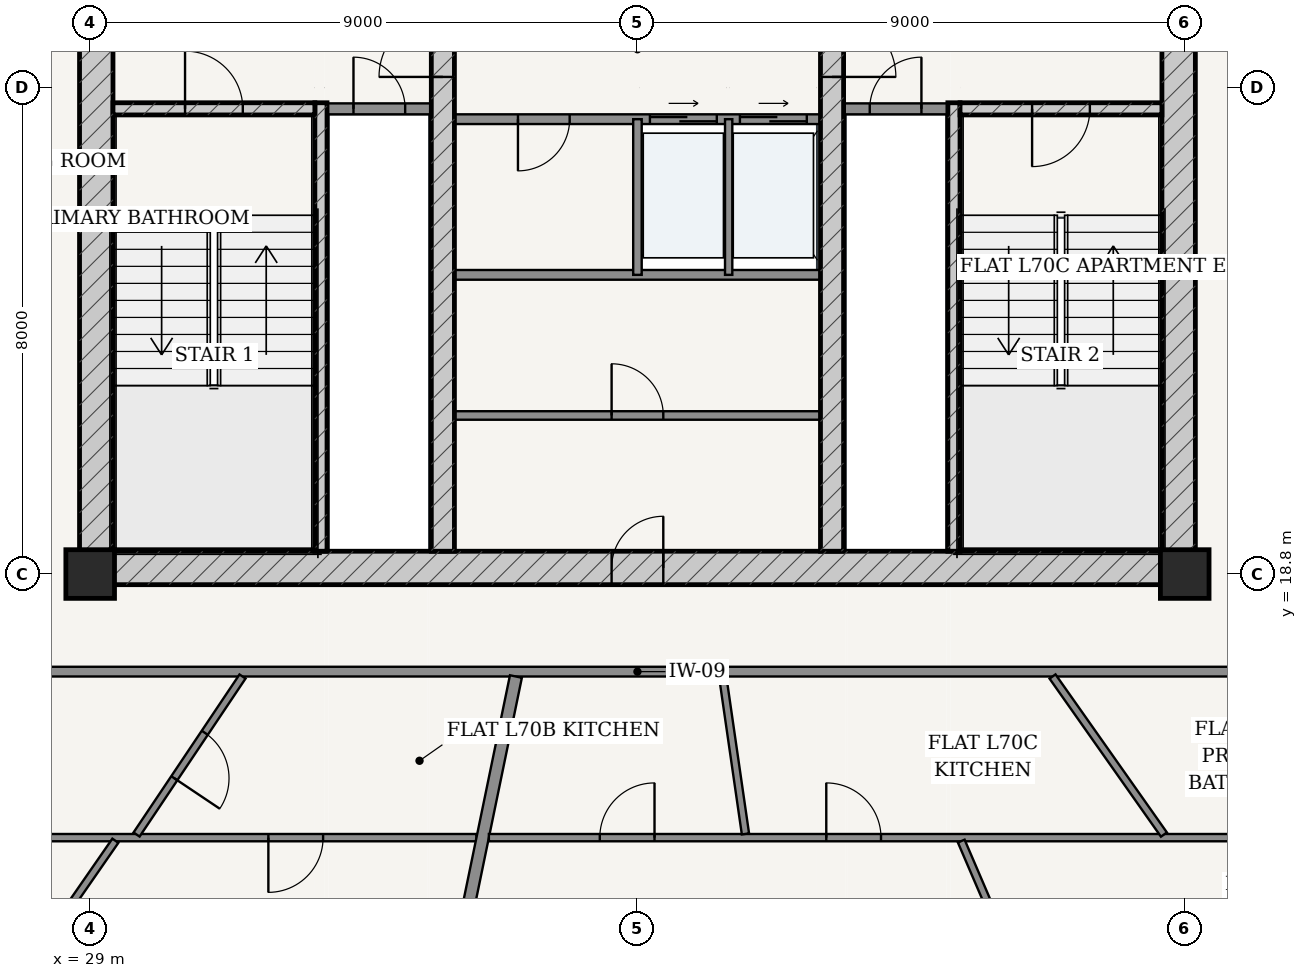
"""IFC4 building model, lengths in metres.
Left out: names, types, materials, properties, quantities, classifications, styles, units other than length and angle.
Written with IfcOpenShell. Run it as: python <this file> out.ifc"""

import sys

from ifc_helpers import new_model, si_unit, direction, frame, frame_2d, origin, origin_2d, place, context, subcontext, project, spatial, rectangle, extrude, source, transform, mapped, element, fill, save


model = new_model("IFC4")
c1 = context("Model", 3, precision=1e-05, world=origin(), true_north=direction((-0.2419218956, 0.970295726276)))
c2 = subcontext(c1, "Body", "Model", "MODEL_VIEW")
j1 = project(units=[si_unit("LENGTHUNIT", "METRE"), si_unit("PLANEANGLEUNIT", "RADIAN")], contexts=[c1])
p1 = place(None, origin())
s1 = spatial("IfcSite", under=j1, at=p1, CompositionType="ELEMENT")
p2 = place(p1, origin())
s2 = spatial("IfcBuilding", under=s1, at=p2, CompositionType="ELEMENT")
p3 = place(p2, frame((0.0, 0.0, 266.95)))
s3 = spatial("IfcBuildingStorey", under=s2, at=p3, CompositionType="ELEMENT", Elevation=266.95)
for number, where, z_axis, x_axis in (
    (1, (29.0, 18.8, 0.0), (0.0, 0.0, 1.0), (1.0, 0.0, 0.0)),
    (2, (47.0, 18.8, 0.0), (0.0, 0.0, 1.0), (1.0, 0.0, 0.0)),
):
    element("IfcColumn", number, at=place(p3, frame(where, z_axis=z_axis, x_axis=x_axis)), inside=s3, PredefinedType="COLUMN", context=c2, shape_type="SweptSolid", body=[
        extrude(rectangle(XDim=0.8, YDim=0.8, at=origin_2d()), origin(), (0.0, 0.0, 1.0), 3.75),
    ])
p4 = place(p3, frame((28.825, 18.9, 0.0), z_axis=(0.0, 0.0, 1.0), x_axis=(1.0, 0.0, 0.0)))
e3 = element("IfcWall", 3, at=p4, inside=s3, PredefinedType="SHEAR", context=c2, shape_type="SweptSolid", body=[
    extrude(rectangle(XDim=18.35, YDim=0.55, at=frame_2d((9.175, 0.0))), origin(), (0.0, 0.0, 1.0), 3.49),
])
p5 = place(p4, frame((8.75, 0.0, 0.0)))
e4 = element("IfcOpeningElement", 4, at=p5, cuts=e3, PredefinedType="OPENING", context=c2, shape_type="SweptSolid", body=[
    extrude(rectangle(XDim=0.85, YDim=2.1, at=frame_2d((0.425, 1.05))), frame((0.0, 0.285, 0.0), z_axis=(0.0, -1.0, 0.0), x_axis=(1.0, 0.0, 0.0)), (0.0, 0.0, 1.0), 0.57),
])
p6 = place(p3, frame((29.1, 19.175, 0.0), z_axis=(0.0, 0.0, 1.0), x_axis=(0.0, 1.0, 0.0)))
e5 = element("IfcWall", 5, at=p6, inside=s3, PredefinedType="SHEAR", context=c2, shape_type="SweptSolid", body=[
    extrude(rectangle(XDim=15.25, YDim=0.55, at=frame_2d((7.625, 0.0))), origin(), (0.0, 0.0, 1.0), 3.49),
])
p7 = place(p6, frame((9.875, 0.0, 0.0)))
e6 = element("IfcOpeningElement", 6, at=p7, cuts=e5, PredefinedType="OPENING", context=c2, shape_type="SweptSolid", body=[
    extrude(rectangle(XDim=1.5, YDim=2.2, at=frame_2d((0.75, 1.1))), frame((0.0, 0.285, 0.0), z_axis=(0.0, -1.0, 0.0), x_axis=(1.0, 0.0, 0.0)), (0.0, 0.0, 1.0), 0.57),
])
p8 = place(p3, frame((46.9, 19.175, 0.0), z_axis=(0.0, 0.0, 1.0), x_axis=(0.0, 1.0, 0.0)))
e7 = element("IfcWall", 7, at=p8, inside=s3, PredefinedType="SHEAR", context=c2, shape_type="SweptSolid", body=[
    extrude(rectangle(XDim=15.25, YDim=0.55, at=frame_2d((7.625, 0.0))), origin(), (0.0, 0.0, 1.0), 3.49),
])
p9 = place(p8, frame((9.875, 0.0, 0.0)))
e8 = element("IfcOpeningElement", 8, at=p9, cuts=e7, PredefinedType="OPENING", context=c2, shape_type="SweptSolid", body=[
    extrude(rectangle(XDim=1.5, YDim=2.2, at=frame_2d((0.75, 1.1))), frame((0.0, 0.285, 0.0), z_axis=(0.0, -1.0, 0.0), x_axis=(1.0, 0.0, 0.0)), (0.0, 0.0, 1.0), 0.57),
])
p10 = place(p3, frame((32.795, 19.175, 0.0), z_axis=(0.0, 0.0, 1.0), x_axis=(0.0, 1.0, 0.0)))
e9 = element("IfcWall", 9, at=p10, inside=s3, PredefinedType="SOLIDWALL", context=c2, shape_type="SweptSolid", body=[
    extrude(rectangle(XDim=7.375, YDim=0.2, at=frame_2d((3.688, 0.0))), origin(), (0.0, 0.0, 1.0), 3.49),
])
p11 = place(p3, frame((29.375, 26.45, 0.0), z_axis=(0.0, 0.0, 1.0), x_axis=(1.0, 0.0, 0.0)))
e10 = element("IfcWall", 10, at=p11, inside=s3, PredefinedType="SOLIDWALL", context=c2, shape_type="SweptSolid", body=[
    extrude(rectangle(XDim=3.32, YDim=0.2, at=frame_2d((1.66, 0.0))), origin(), (0.0, 0.0, 1.0), 3.49),
])
p12 = place(p11, frame((1.185, 0.0, 0.0)))
e11 = element("IfcOpeningElement", 11, at=p12, cuts=e10, PredefinedType="OPENING", context=c2, shape_type="SweptSolid", body=[
    extrude(rectangle(XDim=0.95, YDim=2.15, at=frame_2d((0.475, 1.075))), frame((0.0, 0.11, 0.0), z_axis=(0.0, -1.0, 0.0), x_axis=(1.0, 0.0, 0.0)), (0.0, 0.0, 1.0), 0.22),
])
p13 = place(p3, frame((43.205, 19.175, 0.0), z_axis=(0.0, 0.0, 1.0), x_axis=(0.0, 1.0, 0.0)))
e12 = element("IfcWall", 12, at=p13, inside=s3, PredefinedType="SOLIDWALL", context=c2, shape_type="SweptSolid", body=[
    extrude(rectangle(XDim=7.375, YDim=0.2, at=frame_2d((3.688, 0.0))), origin(), (0.0, 0.0, 1.0), 3.49),
])
p14 = place(p3, frame((43.305, 26.45, 0.0), z_axis=(0.0, 0.0, 1.0), x_axis=(1.0, 0.0, 0.0)))
e13 = element("IfcWall", 13, at=p14, inside=s3, PredefinedType="SOLIDWALL", context=c2, shape_type="SweptSolid", body=[
    extrude(rectangle(XDim=3.32, YDim=0.2, at=frame_2d((1.66, 0.0))), origin(), (0.0, 0.0, 1.0), 3.49),
])
p15 = place(p14, frame((1.185, 0.0, 0.0)))
e14 = element("IfcOpeningElement", 14, at=p15, cuts=e13, PredefinedType="OPENING", context=c2, shape_type="SweptSolid", body=[
    extrude(rectangle(XDim=0.95, YDim=2.15, at=frame_2d((0.475, 1.075))), frame((0.0, 0.11, 0.0), z_axis=(0.0, -1.0, 0.0), x_axis=(1.0, 0.0, 0.0)), (0.0, 0.0, 1.0), 0.22),
])
p16 = place(p3, frame((34.8, 19.175, 0.0), z_axis=(0.0, 0.0, 1.0), x_axis=(0.0, 1.0, 0.0)))
e15 = element("IfcWall", 15, at=p16, inside=s3, PredefinedType="SHEAR", context=c2, shape_type="SweptSolid", body=[
    extrude(rectangle(XDim=15.25, YDim=0.38, at=frame_2d((7.625, 0.0))), origin(), (0.0, 0.0, 1.0), 3.49),
])
p17 = place(p16, frame((7.8, 0.0, 0.0)))
e16 = element("IfcOpeningElement", 16, at=p17, cuts=e15, PredefinedType="OPENING", context=c2, shape_type="SweptSolid", body=[
    extrude(rectangle(XDim=1.05, YDim=2.15, at=frame_2d((0.525, 1.075))), frame((0.0, 0.2, 0.0), z_axis=(0.0, -1.0, 0.0), x_axis=(1.0, 0.0, 0.0)), (0.0, 0.0, 1.0), 0.4),
])
p18 = place(p3, frame((41.2, 19.175, 0.0), z_axis=(0.0, 0.0, 1.0), x_axis=(0.0, 1.0, 0.0)))
e17 = element("IfcWall", 17, at=p18, inside=s3, PredefinedType="SHEAR", context=c2, shape_type="SweptSolid", body=[
    extrude(rectangle(XDim=15.25, YDim=0.38, at=frame_2d((7.625, 0.0))), origin(), (0.0, 0.0, 1.0), 3.49),
])
p19 = place(p18, frame((7.8, 0.0, 0.0)))
e18 = element("IfcOpeningElement", 18, at=p19, cuts=e17, PredefinedType="OPENING", context=c2, shape_type="SweptSolid", body=[
    extrude(rectangle(XDim=1.05, YDim=2.15, at=frame_2d((0.525, 1.075))), frame((0.0, 0.2, 0.0), z_axis=(0.0, -1.0, 0.0), x_axis=(1.0, 0.0, 0.0)), (0.0, 0.0, 1.0), 0.4),
])
p20 = place(p3, frame((32.9, 26.45, 0.0), z_axis=(0.0, 0.0, 1.0), x_axis=(1.0, 0.0, 0.0)))
e19 = element("IfcWall", 19, at=p20, inside=s3, PredefinedType="PARTITIONING", context=c2, shape_type="SweptSolid", body=[
    extrude(rectangle(XDim=1.71, YDim=0.18, at=frame_2d((0.855, 0.0))), origin(), (0.0, 0.0, 1.0), 3.49),
])
p21 = place(p20, frame((0.43, 0.0, 0.0)))
e20 = element("IfcOpeningElement", 20, at=p21, cuts=e19, PredefinedType="OPENING", context=c2, shape_type="SweptSolid", body=[
    extrude(rectangle(XDim=0.85, YDim=2.1, at=frame_2d((0.425, 1.05))), frame((0.0, 0.1, 0.0), z_axis=(0.0, -1.0, 0.0), x_axis=(1.0, 0.0, 0.0)), (0.0, 0.0, 1.0), 0.2),
])
p22 = place(p3, frame((41.39, 26.45, 0.0), z_axis=(0.0, 0.0, 1.0), x_axis=(1.0, 0.0, 0.0)))
e21 = element("IfcWall", 21, at=p22, inside=s3, PredefinedType="PARTITIONING", context=c2, shape_type="SweptSolid", body=[
    extrude(rectangle(XDim=1.71, YDim=0.18, at=frame_2d((0.855, 0.0))), origin(), (0.0, 0.0, 1.0), 3.49),
])
p23 = place(p22, frame((0.43, 0.0, 0.0)))
e22 = element("IfcOpeningElement", 22, at=p23, cuts=e21, PredefinedType="OPENING", context=c2, shape_type="SweptSolid", body=[
    extrude(rectangle(XDim=0.85, YDim=2.1, at=frame_2d((0.425, 1.05))), frame((0.0, 0.1, 0.0), z_axis=(0.0, -1.0, 0.0), x_axis=(1.0, 0.0, 0.0)), (0.0, 0.0, 1.0), 0.2),
])
p24 = place(p3, frame((34.99, 26.28, 0.0), z_axis=(0.0, 0.0, 1.0), x_axis=(1.0, 0.0, 0.0)))
e23 = element("IfcWall", 23, at=p24, inside=s3, PredefinedType="PARTITIONING", context=c2, shape_type="SweptSolid", body=[
    extrude(rectangle(XDim=6.02, YDim=0.16, at=frame_2d((3.01, 0.0))), origin(), (0.0, 0.0, 1.0), 3.49),
])
p25 = place(p24, frame((1.045, 0.0, 0.0)))
e24 = element("IfcOpeningElement", 24, at=p25, cuts=e23, PredefinedType="OPENING", context=c2, shape_type="SweptSolid", body=[
    extrude(rectangle(XDim=0.85, YDim=2.1, at=frame_2d((0.425, 1.05))), frame((0.0, 0.09, 0.0), z_axis=(0.0, -1.0, 0.0), x_axis=(1.0, 0.0, 0.0)), (0.0, 0.0, 1.0), 0.18),
])
p26 = place(p24, frame((3.215, 0.0, 0.0)))
e25 = element("IfcOpeningElement", 25, at=p26, cuts=e23, PredefinedType="OPENING", context=c2, shape_type="SweptSolid", body=[
    extrude(rectangle(XDim=1.1, YDim=2.2, at=frame_2d((0.55, 1.1))), frame((0.0, 0.09, 0.0), z_axis=(0.0, -1.0, 0.0), x_axis=(1.0, 0.0, 0.0)), (0.0, 0.0, 1.0), 0.18),
])
p27 = place(p24, frame((4.695, 0.0, 0.0)))
e26 = element("IfcOpeningElement", 26, at=p27, cuts=e23, PredefinedType="OPENING", context=c2, shape_type="SweptSolid", body=[
    extrude(rectangle(XDim=1.1, YDim=2.2, at=frame_2d((0.55, 1.1))), frame((0.0, 0.09, 0.0), z_axis=(0.0, -1.0, 0.0), x_axis=(1.0, 0.0, 0.0)), (0.0, 0.0, 1.0), 0.18),
])
p28 = place(p3, frame((34.99, 23.72, 0.0), z_axis=(0.0, 0.0, 1.0), x_axis=(1.0, 0.0, 0.0)))
e27 = element("IfcWall", 27, at=p28, inside=s3, PredefinedType="PARTITIONING", context=c2, shape_type="SweptSolid", body=[
    extrude(rectangle(XDim=6.02, YDim=0.16, at=frame_2d((3.01, 0.0))), origin(), (0.0, 0.0, 1.0), 3.49),
])
p29 = place(p3, frame((38.0, 23.72, 0.0), z_axis=(0.0, 0.0, 1.0), x_axis=(0.0, 1.0, 0.0)))
e28 = element("IfcWall", 28, at=p29, inside=s3, PredefinedType="PARTITIONING", context=c2, shape_type="SweptSolid", body=[
    extrude(rectangle(XDim=2.56, YDim=0.14, at=frame_2d((1.28, 0.0))), origin(), (0.0, 0.0, 1.0), 3.49),
])
p30 = place(p3, frame((39.5, 23.72, 0.0), z_axis=(0.0, 0.0, 1.0), x_axis=(0.0, 1.0, 0.0)))
e29 = element("IfcWall", 29, at=p30, inside=s3, PredefinedType="PARTITIONING", context=c2, shape_type="SweptSolid", body=[
    extrude(rectangle(XDim=2.56, YDim=0.12, at=frame_2d((1.28, 0.0))), origin(), (0.0, 0.0, 1.0), 3.49),
])
p31 = place(p3, frame((34.99, 21.407, 0.0), z_axis=(0.0, 0.0, 1.0), x_axis=(1.0, 0.0, 0.0)))
e30 = element("IfcWall", 30, at=p31, inside=s3, PredefinedType="PARTITIONING", context=c2, shape_type="SweptSolid", body=[
    extrude(rectangle(XDim=6.02, YDim=0.14, at=frame_2d((3.01, 0.0))), origin(), (0.0, 0.0, 1.0), 3.49),
])
p32 = place(p31, frame((2.585, 0.0, 0.0)))
e31 = element("IfcOpeningElement", 31, at=p32, cuts=e30, PredefinedType="OPENING", context=c2, shape_type="SweptSolid", body=[
    extrude(rectangle(XDim=0.85, YDim=2.1, at=frame_2d((0.425, 1.05))), frame((0.0, 0.08, 0.0), z_axis=(0.0, -1.0, 0.0), x_axis=(1.0, 0.0, 0.0)), (0.0, 0.0, 1.0), 0.16),
])
p33 = place(p3, frame((26.895, 17.195, 0.0), z_axis=(0.0, 0.0, 1.0), x_axis=(1.0, 0.0, 0.0)))
e32 = element("IfcWall", 32, at=p33, inside=s3, PredefinedType="PARTITIONING", context=c2, shape_type="SweptSolid", body=[
    extrude(rectangle(XDim=22.21, YDim=0.16, at=frame_2d((11.105, 0.0))), origin(), (0.0, 0.0, 1.0), 3.015),
])
p34 = place(p3, frame((35.353, 14.465, 0.0), z_axis=(0.0, 0.0, 1.0), x_axis=(-1.0, 0.0, 0.0)))
e33 = element("IfcWall", 33, at=p34, inside=s3, PredefinedType="PARTITIONING", context=c2, shape_type="SweptSolid", body=[
    extrude(rectangle(XDim=11.188, YDim=0.12, at=frame_2d((5.594, 0.0))), origin(), (0.0, 0.0, 1.0), 3.015),
])
p35 = place(p34, frame((2.522, 0.0, 0.0)))
e34 = element("IfcOpeningElement", 34, at=p35, cuts=e33, PredefinedType="OPENING", context=c2, shape_type="SweptSolid", body=[
    extrude(rectangle(XDim=0.9, YDim=2.15, at=frame_2d((0.45, 1.075))), frame((0.0, 0.07, 0.0), z_axis=(0.0, -1.0, 0.0), x_axis=(1.0, 0.0, 0.0)), (0.0, 0.0, 1.0), 0.14),
])
p36 = place(p3, frame((29.414, 14.414, 0.0), z_axis=(0.0, 0.0, 1.0), x_axis=(-0.569657021681, -0.821882520589, 0.0)))
e35 = element("IfcWall", 35, at=p36, inside=s3, PredefinedType="PARTITIONING", context=c2, shape_type="SweptSolid", body=[
    extrude(rectangle(XDim=3.748, YDim=0.12, at=frame_2d((1.874, 0.0))), origin(), (0.0, 0.0, 1.0), 3.015),
])
p37 = place(p3, frame((31.505, 17.115, 0.0), z_axis=(0.0, 0.0, 1.0), x_axis=(-0.557003057019, -0.83051044212, 0.0)))
e36 = element("IfcWall", 36, at=p37, inside=s3, PredefinedType="PARTITIONING", context=c2, shape_type="SweptSolid", body=[
    extrude(rectangle(XDim=3.129, YDim=0.12, at=frame_2d((1.564, 0.0))), origin(), (0.0, 0.0, 1.0), 3.209),
])
p38 = place(p37, frame((1.114, 0.0, 0.0)))
e37 = element("IfcOpeningElement", 37, at=p38, cuts=e36, PredefinedType="OPENING", context=c2, shape_type="SweptSolid", body=[
    extrude(rectangle(XDim=0.9, YDim=2.15, at=frame_2d((0.45, 1.075))), frame((0.0, 0.07, 0.0), z_axis=(0.0, -1.0, 0.0), x_axis=(1.0, 0.0, 0.0)), (0.0, 0.0, 1.0), 0.14),
])
p39 = place(p3, frame((36.001, 17.115, 0.0), z_axis=(0.0, 0.0, 1.0), x_axis=(-0.202108543081, -0.979363128167, 0.0)))
e38 = element("IfcWall", 38, at=p39, inside=s3, PredefinedType="PARTITIONING", context=c2, shape_type="SweptSolid", body=[
    extrude(rectangle(XDim=8.739, YDim=0.2, at=frame_2d((4.369, 0.0))), origin(), (0.0, 0.0, 1.0), 3.015),
])
p40 = place(p3, frame((51.835, 14.465, 0.0), z_axis=(0.0, 0.0, 1.0), x_axis=(-1.0, 0.0, 0.0)))
e39 = element("IfcWall", 39, at=p40, inside=s3, PredefinedType="PARTITIONING", context=c2, shape_type="SweptSolid", body=[
    extrude(rectangle(XDim=16.278, YDim=0.12, at=frame_2d((8.139, 0.0))), origin(), (0.0, 0.0, 1.0), 3.015),
])
p41 = place(p40, frame((9.83, 0.0, 0.0)))
e40 = element("IfcOpeningElement", 40, at=p41, cuts=e39, PredefinedType="OPENING", context=c2, shape_type="SweptSolid", body=[
    extrude(rectangle(XDim=0.9, YDim=2.15, at=frame_2d((0.45, 1.075))), frame((0.0, 0.07, 0.0), z_axis=(0.0, -1.0, 0.0), x_axis=(1.0, 0.0, 0.0)), (0.0, 0.0, 1.0), 0.14),
])
p42 = place(p40, frame((13.554, 0.0, 0.0)))
e41 = element("IfcOpeningElement", 41, at=p42, cuts=e39, PredefinedType="OPENING", context=c2, shape_type="SweptSolid", body=[
    extrude(rectangle(XDim=0.9, YDim=2.15, at=frame_2d((0.45, 1.075))), frame((0.0, 0.07, 0.0), z_axis=(0.0, -1.0, 0.0), x_axis=(1.0, 0.0, 0.0)), (0.0, 0.0, 1.0), 0.14),
])
p43 = place(p3, frame((43.325, 14.408, 0.0), z_axis=(0.0, 0.0, 1.0), x_axis=(0.394816056217, -0.918760187292, 0.0)))
e42 = element("IfcWall", 42, at=p43, inside=s3, PredefinedType="PARTITIONING", context=c2, shape_type="SweptSolid", body=[
    extrude(rectangle(XDim=5.256, YDim=0.12, at=frame_2d((2.628, 0.0))), origin(), (0.0, 0.0, 1.0), 3.121),
])
p44 = place(p43, frame((2.178, 0.0, 0.0)))
e43 = element("IfcOpeningElement", 43, at=p44, cuts=e42, PredefinedType="OPENING", context=c2, shape_type="SweptSolid", body=[
    extrude(rectangle(XDim=0.9, YDim=2.15, at=frame_2d((0.45, 1.075))), frame((0.0, 0.07, 0.0), z_axis=(0.0, -1.0, 0.0), x_axis=(1.0, 0.0, 0.0)), (0.0, 0.0, 1.0), 0.14),
])
p45 = place(p3, frame((39.402, 17.115, 0.0), z_axis=(0.0, 0.0, 1.0), x_axis=(0.143185278857, -0.989695900728, 0.0)))
e44 = element("IfcWall", 44, at=p45, inside=s3, PredefinedType="PARTITIONING", context=c2, shape_type="SweptSolid", body=[
    extrude(rectangle(XDim=2.615, YDim=0.12, at=frame_2d((1.308, 0.0))), origin(), (0.0, 0.0, 1.0), 3.49),
])
p46 = place(p3, frame((44.826, 17.115, 0.0), z_axis=(0.0, 0.0, 1.0), x_axis=(0.57609227969, -0.817384661761, 0.0)))
e45 = element("IfcWall", 45, at=p46, inside=s3, PredefinedType="PARTITIONING", context=c2, shape_type="SweptSolid", body=[
    extrude(rectangle(XDim=3.18, YDim=0.12, at=frame_2d((1.59, 0.0))), origin(), (0.0, 0.0, 1.0), 3.209),
])
m1 = source(origin(), c2, "Body", "SweptSolid", [
    extrude(rectangle(XDim=1.05, YDim=2.15, at=frame_2d((0.525, 1.075))), frame((0.0, 0.025, 0.0), z_axis=(0.0, -1.0, 0.0), x_axis=(1.0, 0.0, 0.0)), (0.0, 0.0, 1.0), 0.05),
])
p47 = place(p17, origin())
e46 = element("IfcDoor", 46, at=p47, inside=s3, OperationType="SINGLE_SWING_LEFT", PredefinedType="DOOR", context=c2, shape_type="MappedRepresentation", body=[
    mapped(m1, transform((0.0, 0.0, 0.0), scale=1.0)),
])
fill(e16, e46)
p48 = place(p19, frame((1.05, 0.0, 0.0), z_axis=(0.0, 0.0, 1.0), x_axis=(-1.0, 0.0, 0.0)))
e47 = element("IfcDoor", 47, at=p48, inside=s3, OperationType="SINGLE_SWING_RIGHT", PredefinedType="DOOR", context=c2, shape_type="MappedRepresentation", body=[
    mapped(m1, transform((0.0, 0.0, 0.0), scale=1.0)),
])
fill(e18, e47)
m2 = source(origin(), c2, "Body", "SweptSolid", [
    extrude(rectangle(XDim=0.95, YDim=2.15, at=frame_2d((0.475, 1.075))), frame((0.0, 0.025, 0.0), z_axis=(0.0, -1.0, 0.0), x_axis=(1.0, 0.0, 0.0)), (0.0, 0.0, 1.0), 0.05),
])
p49 = place(p12, origin())
e48 = element("IfcDoor", 48, at=p49, inside=s3, OperationType="SINGLE_SWING_LEFT", PredefinedType="DOOR", context=c2, shape_type="MappedRepresentation", body=[
    mapped(m2, transform((0.0, 0.0, 0.0), scale=1.0)),
])
fill(e11, e48)
p50 = place(p15, frame((0.95, 0.0, 0.0), z_axis=(0.0, 0.0, 1.0), x_axis=(-1.0, 0.0, 0.0)))
e49 = element("IfcDoor", 49, at=p50, inside=s3, OperationType="SINGLE_SWING_RIGHT", PredefinedType="DOOR", context=c2, shape_type="MappedRepresentation", body=[
    mapped(m2, transform((0.0, 0.0, 0.0), scale=1.0)),
])
fill(e14, e49)
m3 = source(origin(), c2, "Body", "SweptSolid", [
    extrude(rectangle(XDim=0.85, YDim=2.1, at=frame_2d((0.425, 1.05))), frame((0.0, 0.025, 0.0), z_axis=(0.0, -1.0, 0.0), x_axis=(1.0, 0.0, 0.0)), (0.0, 0.0, 1.0), 0.05),
])
p51 = place(p21, origin())
e50 = element("IfcDoor", 50, at=p51, inside=s3, OperationType="SINGLE_SWING_LEFT", PredefinedType="DOOR", context=c2, shape_type="MappedRepresentation", body=[
    mapped(m3, transform((0.0, 0.0, 0.0), scale=1.0)),
])
fill(e20, e50)
p52 = place(p23, origin())
e51 = element("IfcDoor", 51, at=p52, inside=s3, OperationType="SINGLE_SWING_RIGHT", PredefinedType="DOOR", context=c2, shape_type="MappedRepresentation", body=[
    mapped(m3, transform((0.0, 0.0, 0.0), scale=1.0)),
])
fill(e22, e51)
p53 = place(p25, frame((0.85, 0.0, 0.0), z_axis=(0.0, 0.0, 1.0), x_axis=(-1.0, 0.0, 0.0)))
e52 = element("IfcDoor", 52, at=p53, inside=s3, OperationType="SINGLE_SWING_RIGHT", PredefinedType="DOOR", context=c2, shape_type="MappedRepresentation", body=[
    mapped(m3, transform((0.0, 0.0, 0.0), scale=1.0)),
])
fill(e24, e52)
p54 = place(p5, origin())
e53 = element("IfcDoor", 53, at=p54, inside=s3, OperationType="SINGLE_SWING_RIGHT", PredefinedType="DOOR", context=c2, shape_type="MappedRepresentation", body=[
    mapped(m3, transform((0.0, 0.0, 0.0), scale=1.0)),
])
fill(e4, e53)
p55 = place(p32, origin())
e54 = element("IfcDoor", 54, at=p55, inside=s3, OperationType="SINGLE_SWING_LEFT", PredefinedType="DOOR", context=c2, shape_type="MappedRepresentation", body=[
    mapped(m3, transform((0.0, 0.0, 0.0), scale=1.0)),
])
fill(e31, e54)
m4 = source(origin(), c2, "Body", "SweptSolid", [
    extrude(rectangle(XDim=1.1, YDim=2.2, at=frame_2d((0.55, 1.1))), frame((0.0, 0.025, 0.0), z_axis=(0.0, -1.0, 0.0), x_axis=(1.0, 0.0, 0.0)), (0.0, 0.0, 1.0), 0.05),
])
p56 = place(p26, origin())
e55 = element("IfcDoor", 55, at=p56, inside=s3, OperationType="DOUBLE_DOOR_SLIDING", PredefinedType="DOOR", context=c2, shape_type="MappedRepresentation", body=[
    mapped(m4, transform((0.0, 0.0, 0.0), scale=1.0)),
])
fill(e25, e55)
p57 = place(p27, origin())
e56 = element("IfcDoor", 56, at=p57, inside=s3, OperationType="DOUBLE_DOOR_SLIDING", PredefinedType="DOOR", context=c2, shape_type="MappedRepresentation", body=[
    mapped(m4, transform((0.0, 0.0, 0.0), scale=1.0)),
])
fill(e26, e56)
m5 = source(origin(), c2, "Body", "SweptSolid", [
    extrude(rectangle(XDim=0.9, YDim=2.15, at=frame_2d((0.45, 1.075))), frame((0.0, 0.025, 0.0), z_axis=(0.0, -1.0, 0.0), x_axis=(1.0, 0.0, 0.0)), (0.0, 0.0, 1.0), 0.05),
])
p58 = place(p38, origin())
e57 = element("IfcDoor", 57, at=p58, inside=s3, OperationType="SINGLE_SWING_RIGHT", PredefinedType="DOOR", context=c2, shape_type="MappedRepresentation", body=[
    mapped(m5, transform((0.0, 0.0, 0.0), scale=1.0)),
])
fill(e37, e57)
p59 = place(p35, origin())
e58 = element("IfcDoor", 58, at=p59, inside=s3, OperationType="SINGLE_SWING_RIGHT", PredefinedType="DOOR", context=c2, shape_type="MappedRepresentation", body=[
    mapped(m5, transform((0.0, 0.0, 0.0), scale=1.0)),
])
fill(e34, e58)
p60 = place(p41, frame((0.9, 0.0, 0.0), z_axis=(0.0, 0.0, 1.0), x_axis=(-1.0, 0.0, 0.0)))
e59 = element("IfcDoor", 59, at=p60, inside=s3, OperationType="SINGLE_SWING_LEFT", PredefinedType="DOOR", context=c2, shape_type="MappedRepresentation", body=[
    mapped(m5, transform((0.0, 0.0, 0.0), scale=1.0)),
])
fill(e40, e59)
p61 = place(p42, frame((0.9, 0.0, 0.0), z_axis=(0.0, 0.0, 1.0), x_axis=(-1.0, 0.0, 0.0)))
e60 = element("IfcDoor", 60, at=p61, inside=s3, OperationType="SINGLE_SWING_RIGHT", PredefinedType="DOOR", context=c2, shape_type="MappedRepresentation", body=[
    mapped(m5, transform((0.0, 0.0, 0.0), scale=1.0)),
])
fill(e41, e60)
save(model, sys.argv[1])
